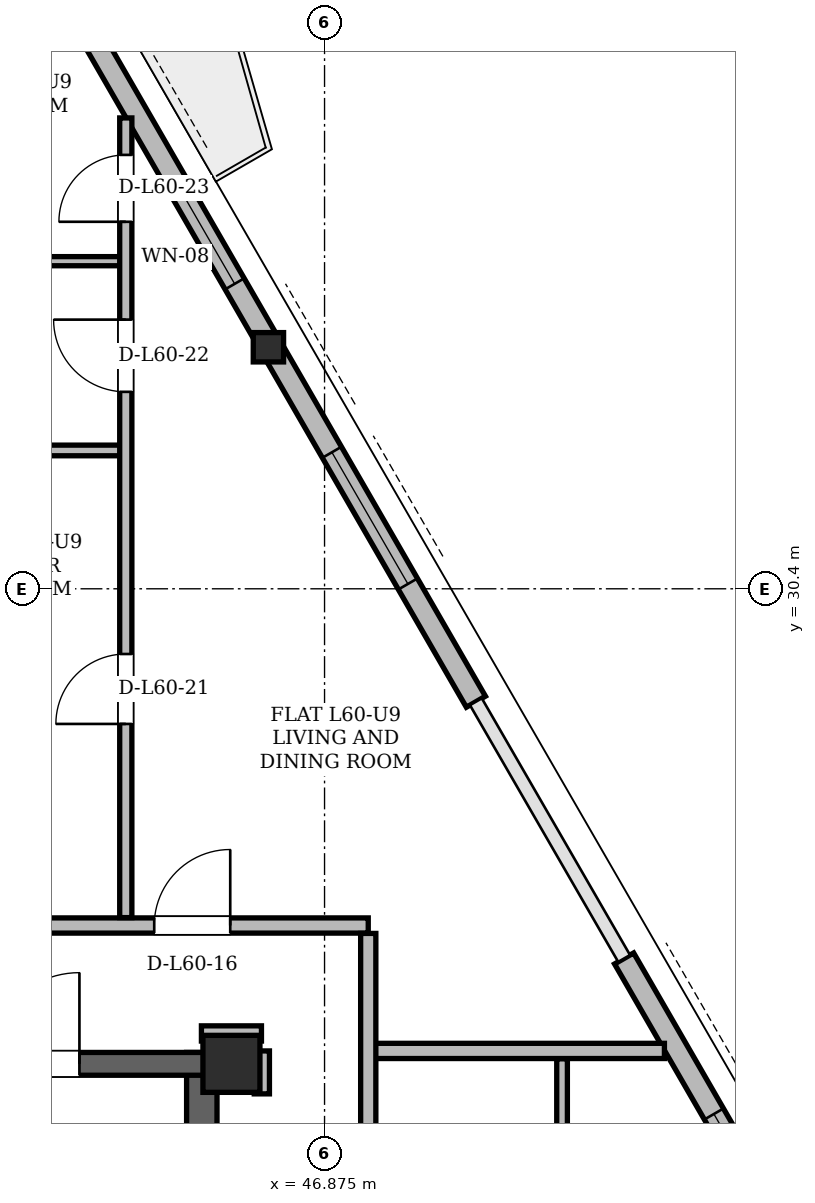
"""IFC4 building model, lengths in metres.
Left out: names, types, materials, properties, quantities, classifications, styles, units other than length and angle.
Written with IfcOpenShell. Run it as: python <this file> out.ifc"""

import sys

from ifc_helpers import new_model, si_unit, direction, frame, frame_2d, origin, origin_2d, place, context, subcontext, project, spatial, rectangle, hollow_rectangle, i_section, extrude, element, fill, save


model = new_model("IFC4")
c1 = context("Model", 3, precision=1e-05, world=origin(), true_north=direction((0.0, 1.0)))
c2 = subcontext(c1, "Body", "Model", "MODEL_VIEW")
j1 = project(units=[si_unit("LENGTHUNIT", "METRE"), si_unit("PLANEANGLEUNIT", "RADIAN")], contexts=[c1])
p1 = place(None, origin())
s1 = spatial("IfcSite", under=j1, at=p1, CompositionType="ELEMENT")
p2 = place(p1, origin())
s2 = spatial("IfcBuilding", under=s1, at=p2, CompositionType="ELEMENT")
p3 = place(p2, frame((0.0, 0.0, 227.1)))
s3 = spatial("IfcBuildingStorey", under=s2, at=p3, CompositionType="ELEMENT", Elevation=227.1)
p4 = place(p3, frame((45.65, 24.15, 0.0), z_axis=(0.0, 0.0, 1.0), x_axis=(1.0, 0.0, 0.0)))
e1 = element("IfcColumn", 1, at=p4, inside=s3, PredefinedType="COLUMN", context=c2, shape_type="SweptSolid", body=[
    extrude(hollow_rectangle(XDim=0.75, YDim=0.75, WallThickness=0.06, at=origin_2d()), origin(), (0.0, 0.0, 1.0), 3.6),
])
p5 = place(p3, frame((46.167, 33.589, 0.004), z_axis=(-0.017129504481, -0.006389577068, 0.999832862723), x_axis=(0.349493096334, -0.936938939107, 0.0)))
e2 = element("IfcColumn", 2, at=p5, inside=s3, PredefinedType="COLUMN", context=c2, shape_type="SweptSolid", body=[
    extrude(i_section(OverallWidth=0.399, OverallDepth=0.386, WebThickness=0.021, FlangeThickness=0.033, at=origin_2d()), origin(), (0.0, 0.0, 1.0), 3.592),
])
p6 = place(p3, frame((45.26, 11.0, 0.0), z_axis=(0.0, 0.0, 1.0), x_axis=(0.0, 1.0, 0.0)))
e3 = element("IfcWall", 3, at=p6, inside=s3, PredefinedType="SHEAR", context=c2, shape_type="SweptSolid", body=[
    extrude(rectangle(XDim=13.3, YDim=0.4, at=frame_2d((6.65, 0.0))), origin(), (0.0, 0.0, 1.0), 3.38),
])
p7 = place(p3, frame((29.65, 24.15, 0.0), z_axis=(0.0, 0.0, 1.0), x_axis=(1.0, 0.0, 0.0)))
e4 = element("IfcWall", 4, at=p7, inside=s3, PredefinedType="SHEAR", context=c2, shape_type="SweptSolid", body=[
    extrude(rectangle(XDim=15.7, YDim=0.3, at=frame_2d((7.85, 0.0))), origin(), (0.0, 0.0, 1.0), 3.38),
])
p8 = place(p7, frame((1.7, 0.0, 0.0)))
e5 = element("IfcOpeningElement", 5, at=p8, cuts=e4, PredefinedType="OPENING", context=c2, shape_type="SweptSolid", body=[
    extrude(rectangle(XDim=1.2, YDim=2.2, at=frame_2d((0.6, 1.1))), frame((0.0, 0.15, 0.0), z_axis=(0.0, -1.0, 0.0), x_axis=(1.0, 0.0, 0.0)), (0.0, 0.0, 1.0), 0.3),
])
p9 = place(p7, frame((12.8, 0.0, 0.0)))
e6 = element("IfcOpeningElement", 6, at=p9, cuts=e4, PredefinedType="OPENING", context=c2, shape_type="SweptSolid", body=[
    extrude(rectangle(XDim=1.2, YDim=2.2, at=frame_2d((0.6, 1.1))), frame((0.0, 0.15, 0.0), z_axis=(0.0, -1.0, 0.0), x_axis=(1.0, 0.0, 0.0)), (0.0, 0.0, 1.0), 0.3),
])
p10 = place(p7, frame((6.55, 0.0, 0.0)))
e7 = element("IfcOpeningElement", 7, at=p10, cuts=e4, PredefinedType="OPENING", context=c2, shape_type="SweptSolid", body=[
    extrude(rectangle(XDim=0.9, YDim=2.05, at=frame_2d((0.45, 1.025))), frame((0.0, 0.15, 0.0), z_axis=(0.0, -1.0, 0.0), x_axis=(1.0, 0.0, 0.0)), (0.0, 0.0, 1.0), 0.3),
])
p11 = place(p7, frame((8.45, 0.0, 0.0)))
e8 = element("IfcOpeningElement", 8, at=p11, cuts=e4, PredefinedType="OPENING", context=c2, shape_type="SweptSolid", body=[
    extrude(rectangle(XDim=0.9, YDim=2.05, at=frame_2d((0.45, 1.025))), frame((0.0, 0.15, 0.0), z_axis=(0.0, -1.0, 0.0), x_axis=(1.0, 0.0, 0.0)), (0.0, 0.0, 1.0), 0.3),
])
p12 = place(p3, frame((59.027, 11.316, 0.0), z_axis=(0.0, 0.0, 1.0), x_axis=(-0.499999154439, 0.866025891969, 0.0)))
e9 = element("IfcWall", 9, at=p12, inside=s3, PredefinedType="SOLIDWALL", context=c2, shape_type="SweptSolid", body=[
    extrude(rectangle(XDim=16.421, YDim=0.29, at=frame_2d((8.21, 0.0))), origin(), (0.0, 0.0, 1.0), 2.677),
])
p13 = place(p12, frame((8.034, 0.0, 0.0)))
e10 = element("IfcOpeningElement", 10, at=p13, cuts=e9, PredefinedType="OPENING", context=c2, shape_type="SweptSolid", body=[
    extrude(rectangle(XDim=1.5, YDim=2.2, at=frame_2d((0.75, 1.1))), frame((0.0, 0.145, 0.0), z_axis=(0.0, -1.0, 0.0), x_axis=(1.0, 0.0, 0.0)), (0.0, 0.0, 1.0), 0.29),
])
p14 = place(p12, frame((0.995, 0.0, 0.85)))
e11 = element("IfcOpeningElement", 11, at=p14, cuts=e9, PredefinedType="OPENING", context=c2, shape_type="SweptSolid", body=[
    extrude(rectangle(XDim=2.0, YDim=1.717, at=frame_2d((1.0, 0.858))), frame((0.0, 0.145, 0.0), z_axis=(0.0, -1.0, 0.0), x_axis=(1.0, 0.0, 0.0)), (0.0, 0.0, 1.0), 0.29),
])
p15 = place(p12, frame((12.858, 0.0, 0.85)))
e12 = element("IfcOpeningElement", 12, at=p15, cuts=e9, PredefinedType="OPENING", context=c2, shape_type="SweptSolid", body=[
    extrude(rectangle(XDim=1.2, YDim=1.48, at=frame_2d((0.6, 0.74))), frame((0.0, 0.145, 0.0), z_axis=(0.0, -1.0, 0.0), x_axis=(1.0, 0.0, 0.0)), (0.0, 0.0, 1.0), 0.29),
])
p16 = place(p3, frame((48.866, 28.914, 0.0), z_axis=(0.0, 0.0, 1.0), x_axis=(-0.499999154439, 0.866025891969, 0.0)))
e13 = element("IfcWall", 13, at=p16, inside=s3, PredefinedType="SOLIDWALL", context=c2, shape_type="SweptSolid", body=[
    extrude(rectangle(XDim=16.421, YDim=0.29, at=frame_2d((8.21, 0.0))), origin(), (0.0, 0.0, 1.0), 2.677),
])
p17 = place(p16, frame((11.491, 0.0, 0.0)))
e14 = element("IfcOpeningElement", 14, at=p17, cuts=e13, PredefinedType="OPENING", context=c2, shape_type="SweptSolid", body=[
    extrude(rectangle(XDim=1.5, YDim=2.2, at=frame_2d((0.75, 1.1))), frame((0.0, 0.145, 0.0), z_axis=(0.0, -1.0, 0.0), x_axis=(1.0, 0.0, 0.0)), (0.0, 0.0, 1.0), 0.29),
])
p18 = place(p16, frame((1.789, 0.0, 0.85)))
e15 = element("IfcOpeningElement", 15, at=p18, cuts=e13, PredefinedType="OPENING", context=c2, shape_type="SweptSolid", body=[
    extrude(rectangle(XDim=2.0, YDim=1.717, at=frame_2d((1.0, 0.858))), frame((0.0, 0.145, 0.0), z_axis=(0.0, -1.0, 0.0), x_axis=(1.0, 0.0, 0.0)), (0.0, 0.0, 1.0), 0.29),
])
p19 = place(p16, frame((6.348, 0.0, 0.85)))
e16 = element("IfcOpeningElement", 16, at=p19, cuts=e13, PredefinedType="OPENING", context=c2, shape_type="SweptSolid", body=[
    extrude(rectangle(XDim=1.4, YDim=1.6, at=frame_2d((0.7, 0.8))), frame((0.0, 0.145, 0.0), z_axis=(0.0, -1.0, 0.0), x_axis=(1.0, 0.0, 0.0)), (0.0, 0.0, 1.0), 0.29),
])
p20 = place(p3, frame((47.45, 24.32, 0.0), z_axis=(0.0, 0.0, 1.0), x_axis=(1.0, 0.0, 0.0)))
e17 = element("IfcWall", 17, at=p20, inside=s3, PredefinedType="PARTITIONING", context=c2, shape_type="SweptSolid", body=[
    extrude(rectangle(XDim=3.897, YDim=0.2, at=frame_2d((1.948, 0.0))), origin(), (0.0, 0.0, 1.0), 3.38),
])
p21 = place(p3, frame((45.255, 24.55, 0.0), z_axis=(0.0, 0.0, 1.0), x_axis=(1.0, 0.0, 0.0)))
e18 = element("IfcWall", 18, at=p21, inside=s3, PredefinedType="PARTITIONING", context=c2, shape_type="SweptSolid", body=[
    extrude(rectangle(XDim=0.79, YDim=0.2, at=frame_2d((0.395, 0.0))), origin(), (0.0, 0.0, 1.0), 2.913),
])
p22 = place(p3, frame((25.6, 25.97, 0.0), z_axis=(0.0, 0.0, 1.0), x_axis=(1.0, 0.0, 0.0)))
e19 = element("IfcWall", 19, at=p22, inside=s3, PredefinedType="PARTITIONING", context=c2, shape_type="SweptSolid", body=[
    extrude(rectangle(XDim=21.85, YDim=0.2, at=frame_2d((10.925, 0.0))), origin(), (0.0, 0.0, 1.0), 2.913),
])
p23 = place(p22, frame((3.841, 0.0, 0.0)))
e20 = element("IfcOpeningElement", 20, at=p23, cuts=e19, PredefinedType="OPENING", context=c2, shape_type="SweptSolid", body=[
    extrude(rectangle(XDim=1.0, YDim=2.18, at=frame_2d((0.5, 1.09))), frame((0.0, 0.1, 0.0), z_axis=(0.0, -1.0, 0.0), x_axis=(1.0, 0.0, 0.0)), (0.0, 0.0, 1.0), 0.2),
])
p24 = place(p22, frame((9.75, 0.0, 0.0)))
e21 = element("IfcOpeningElement", 21, at=p24, cuts=e19, PredefinedType="OPENING", context=c2, shape_type="SweptSolid", body=[
    extrude(rectangle(XDim=1.3, YDim=2.2, at=frame_2d((0.65, 1.1))), frame((0.0, 0.1, 0.0), z_axis=(0.0, -1.0, 0.0), x_axis=(1.0, 0.0, 0.0)), (0.0, 0.0, 1.0), 0.2),
])
p25 = place(p22, frame((13.777, 0.0, 0.0)))
e22 = element("IfcOpeningElement", 22, at=p25, cuts=e19, PredefinedType="OPENING", context=c2, shape_type="SweptSolid", body=[
    extrude(rectangle(XDim=1.0, YDim=2.18, at=frame_2d((0.5, 1.09))), frame((0.0, 0.1, 0.0), z_axis=(0.0, -1.0, 0.0), x_axis=(1.0, 0.0, 0.0)), (0.0, 0.0, 1.0), 0.2),
])
p26 = place(p22, frame((19.034, 0.0, 0.0)))
e23 = element("IfcOpeningElement", 23, at=p26, cuts=e19, PredefinedType="OPENING", context=c2, shape_type="SweptSolid", body=[
    extrude(rectangle(XDim=1.0, YDim=2.18, at=frame_2d((0.5, 1.09))), frame((0.0, 0.1, 0.0), z_axis=(0.0, -1.0, 0.0), x_axis=(1.0, 0.0, 0.0)), (0.0, 0.0, 1.0), 0.2),
])
p27 = place(p3, frame((41.45, 32.22, 0.0), z_axis=(0.0, 0.0, 1.0), x_axis=(1.0, 0.0, 0.0)))
e24 = element("IfcWall", 24, at=p27, inside=s3, PredefinedType="PARTITIONING", context=c2, shape_type="SweptSolid", body=[
    extrude(rectangle(XDim=2.807, YDim=0.14, at=frame_2d((1.403, 0.0))), origin(), (0.0, 0.0, 1.0), 2.913),
])
p28 = place(p3, frame((41.45, 34.71, 0.0), z_axis=(0.0, 0.0, 1.0), x_axis=(1.0, 0.0, 0.0)))
e25 = element("IfcWall", 25, at=p28, inside=s3, PredefinedType="PARTITIONING", context=c2, shape_type="SweptSolid", body=[
    extrude(rectangle(XDim=2.807, YDim=0.12, at=frame_2d((1.403, 0.0))), origin(), (0.0, 0.0, 1.0), 2.913),
])
p29 = place(p3, frame((44.26, 26.074, 0.0), z_axis=(0.0, 0.0, 1.0), x_axis=(0.0, 1.0, 0.0)))
e26 = element("IfcWall", 26, at=p29, inside=s3, PredefinedType="PARTITIONING", context=c2, shape_type="SweptSolid", body=[
    extrude(rectangle(XDim=10.521, YDim=0.16, at=frame_2d((5.26, 0.0))), origin(), (0.0, 0.0, 1.0), 2.913),
])
p30 = place(p29, frame((2.548, 0.0, 0.0)))
e27 = element("IfcOpeningElement", 27, at=p30, cuts=e26, PredefinedType="OPENING", context=c2, shape_type="SweptSolid", body=[
    extrude(rectangle(XDim=0.92, YDim=2.12, at=frame_2d((0.46, 1.06))), frame((0.0, 0.08, 0.0), z_axis=(0.0, -1.0, 0.0), x_axis=(1.0, 0.0, 0.0)), (0.0, 0.0, 1.0), 0.16),
])
p31 = place(p29, frame((6.917, 0.0, 0.0)))
e28 = element("IfcOpeningElement", 28, at=p31, cuts=e26, PredefinedType="OPENING", context=c2, shape_type="SweptSolid", body=[
    extrude(rectangle(XDim=0.95, YDim=2.1, at=frame_2d((0.475, 1.05))), frame((0.0, 0.08, 0.0), z_axis=(0.0, -1.0, 0.0), x_axis=(1.0, 0.0, 0.0)), (0.0, 0.0, 1.0), 0.16),
])
p32 = place(p29, frame((9.154, 0.0, 0.0)))
e29 = element("IfcOpeningElement", 29, at=p32, cuts=e26, PredefinedType="OPENING", context=c2, shape_type="SweptSolid", body=[
    extrude(rectangle(XDim=0.88, YDim=2.08, at=frame_2d((0.44, 1.04))), frame((0.0, 0.08, 0.0), z_axis=(0.0, -1.0, 0.0), x_axis=(1.0, 0.0, 0.0)), (0.0, 0.0, 1.0), 0.16),
])
p33 = place(p3, frame((46.05, 23.755, 0.0), z_axis=(0.0, 0.0, 1.0), x_axis=(0.0, 1.0, 0.0)))
e30 = element("IfcWall", 30, at=p33, inside=s3, PredefinedType="PARTITIONING", context=c2, shape_type="SweptSolid", body=[
    extrude(rectangle(XDim=0.565, YDim=0.2, at=frame_2d((0.283, 0.0))), origin(), (0.0, 0.0, 1.0), 3.38),
])
p34 = place(p3, frame((47.45, 9.404, 0.0), z_axis=(0.0, 0.0, 1.0), x_axis=(0.0, 1.0, 0.0)))
e31 = element("IfcWall", 31, at=p34, inside=s3, PredefinedType="PARTITIONING", context=c2, shape_type="SweptSolid", body=[
    extrude(rectangle(XDim=16.462, YDim=0.2, at=frame_2d((8.231, 0.0))), origin(), (0.0, 0.0, 1.0), 2.913),
])
p35 = place(p34, frame((3.163, 0.0, 0.0)))
e32 = element("IfcOpeningElement", 32, at=p35, cuts=e31, PredefinedType="OPENING", context=c2, shape_type="SweptSolid", body=[
    extrude(rectangle(XDim=1.0, YDim=2.18, at=frame_2d((0.5, 1.09))), frame((0.0, 0.1, 0.0), z_axis=(0.0, -1.0, 0.0), x_axis=(1.0, 0.0, 0.0)), (0.0, 0.0, 1.0), 0.2),
])
p36 = place(p34, frame((9.778, 0.0, 0.0)))
e33 = element("IfcOpeningElement", 33, at=p36, cuts=e31, PredefinedType="OPENING", context=c2, shape_type="SweptSolid", body=[
    extrude(rectangle(XDim=1.0, YDim=2.18, at=frame_2d((0.5, 1.09))), frame((0.0, 0.1, 0.0), z_axis=(0.0, -1.0, 0.0), x_axis=(1.0, 0.0, 0.0)), (0.0, 0.0, 1.0), 0.2),
])
p37 = place(p3, frame((50.0, 21.914, 0.0), z_axis=(0.0, 0.0, 1.0), x_axis=(0.0, 1.0, 0.0)))
e34 = element("IfcWall", 34, at=p37, inside=s3, PredefinedType="PARTITIONING", context=c2, shape_type="SweptSolid", body=[
    extrude(rectangle(XDim=2.302, YDim=0.14, at=frame_2d((1.151, 0.0))), origin(), (0.0, 0.0, 1.0), 3.38),
])
p38 = place(p15, origin())
e35 = element("IfcWindow", 35, at=p38, inside=s3, PartitioningType="SINGLE_PANEL", PredefinedType="WINDOW", context=c2, shape_type="SweptSolid", body=[
    extrude(rectangle(XDim=1.2, YDim=1.48, at=frame_2d((0.6, 0.74))), frame((0.0, 0.03, 0.0), z_axis=(0.0, -1.0, 0.0), x_axis=(1.0, 0.0, 0.0)), (0.0, 0.0, 1.0), 0.06),
])
fill(e12, e35)
p39 = place(p18, origin())
e36 = element("IfcWindow", 36, at=p39, inside=s3, PartitioningType="SINGLE_PANEL", PredefinedType="WINDOW", context=c2, shape_type="SweptSolid", body=[
    extrude(rectangle(XDim=2.0, YDim=1.717, at=frame_2d((1.0, 0.858))), frame((0.0, 0.03, 0.0), z_axis=(0.0, -1.0, 0.0), x_axis=(1.0, 0.0, 0.0)), (0.0, 0.0, 1.0), 0.06),
])
fill(e15, e36)
p40 = place(p19, origin())
e37 = element("IfcWindow", 37, at=p40, inside=s3, PartitioningType="SINGLE_PANEL", PredefinedType="WINDOW", context=c2, shape_type="SweptSolid", body=[
    extrude(rectangle(XDim=1.4, YDim=1.6, at=frame_2d((0.7, 0.8))), frame((0.0, 0.03, 0.0), z_axis=(0.0, -1.0, 0.0), x_axis=(1.0, 0.0, 0.0)), (0.0, 0.0, 1.0), 0.06),
])
fill(e16, e37)
p41 = place(p9, origin())
e38 = element("IfcDoor", 38, at=p41, inside=s3, OperationType="SINGLE_SWING_RIGHT", PredefinedType="DOOR", context=c2, shape_type="SweptSolid", body=[
    extrude(rectangle(XDim=1.2, YDim=2.2, at=frame_2d((0.6, 1.1))), frame((0.0, 0.025, 0.0), z_axis=(0.0, -1.0, 0.0), x_axis=(1.0, 0.0, 0.0)), (0.0, 0.0, 1.0), 0.05),
])
fill(e6, e38)
p42 = place(p26, origin())
e39 = element("IfcDoor", 39, at=p42, inside=s3, OperationType="SINGLE_SWING_RIGHT", PredefinedType="DOOR", context=c2, shape_type="SweptSolid", body=[
    extrude(rectangle(XDim=1.0, YDim=2.18, at=frame_2d((0.5, 1.09))), frame((0.0, 0.025, 0.0), z_axis=(0.0, -1.0, 0.0), x_axis=(1.0, 0.0, 0.0)), (0.0, 0.0, 1.0), 0.05),
])
fill(e23, e39)
p43 = place(p30, origin())
e40 = element("IfcDoor", 40, at=p43, inside=s3, OperationType="SINGLE_SWING_LEFT", PredefinedType="DOOR", context=c2, shape_type="SweptSolid", body=[
    extrude(rectangle(XDim=0.92, YDim=2.12, at=frame_2d((0.46, 1.06))), frame((0.0, 0.025, 0.0), z_axis=(0.0, -1.0, 0.0), x_axis=(1.0, 0.0, 0.0)), (0.0, 0.0, 1.0), 0.05),
])
fill(e27, e40)
p44 = place(p31, origin())
e41 = element("IfcDoor", 41, at=p44, inside=s3, OperationType="SINGLE_SWING_RIGHT", PredefinedType="DOOR", context=c2, shape_type="SweptSolid", body=[
    extrude(rectangle(XDim=0.95, YDim=2.1, at=frame_2d((0.475, 1.05))), frame((0.0, 0.025, 0.0), z_axis=(0.0, -1.0, 0.0), x_axis=(1.0, 0.0, 0.0)), (0.0, 0.0, 1.0), 0.05),
])
fill(e28, e41)
p45 = place(p32, origin())
e42 = element("IfcDoor", 42, at=p45, inside=s3, OperationType="SINGLE_SWING_LEFT", PredefinedType="DOOR", context=c2, shape_type="SweptSolid", body=[
    extrude(rectangle(XDim=0.88, YDim=2.08, at=frame_2d((0.44, 1.04))), frame((0.0, 0.025, 0.0), z_axis=(0.0, -1.0, 0.0), x_axis=(1.0, 0.0, 0.0)), (0.0, 0.0, 1.0), 0.05),
])
fill(e29, e42)
save(model, sys.argv[1])
